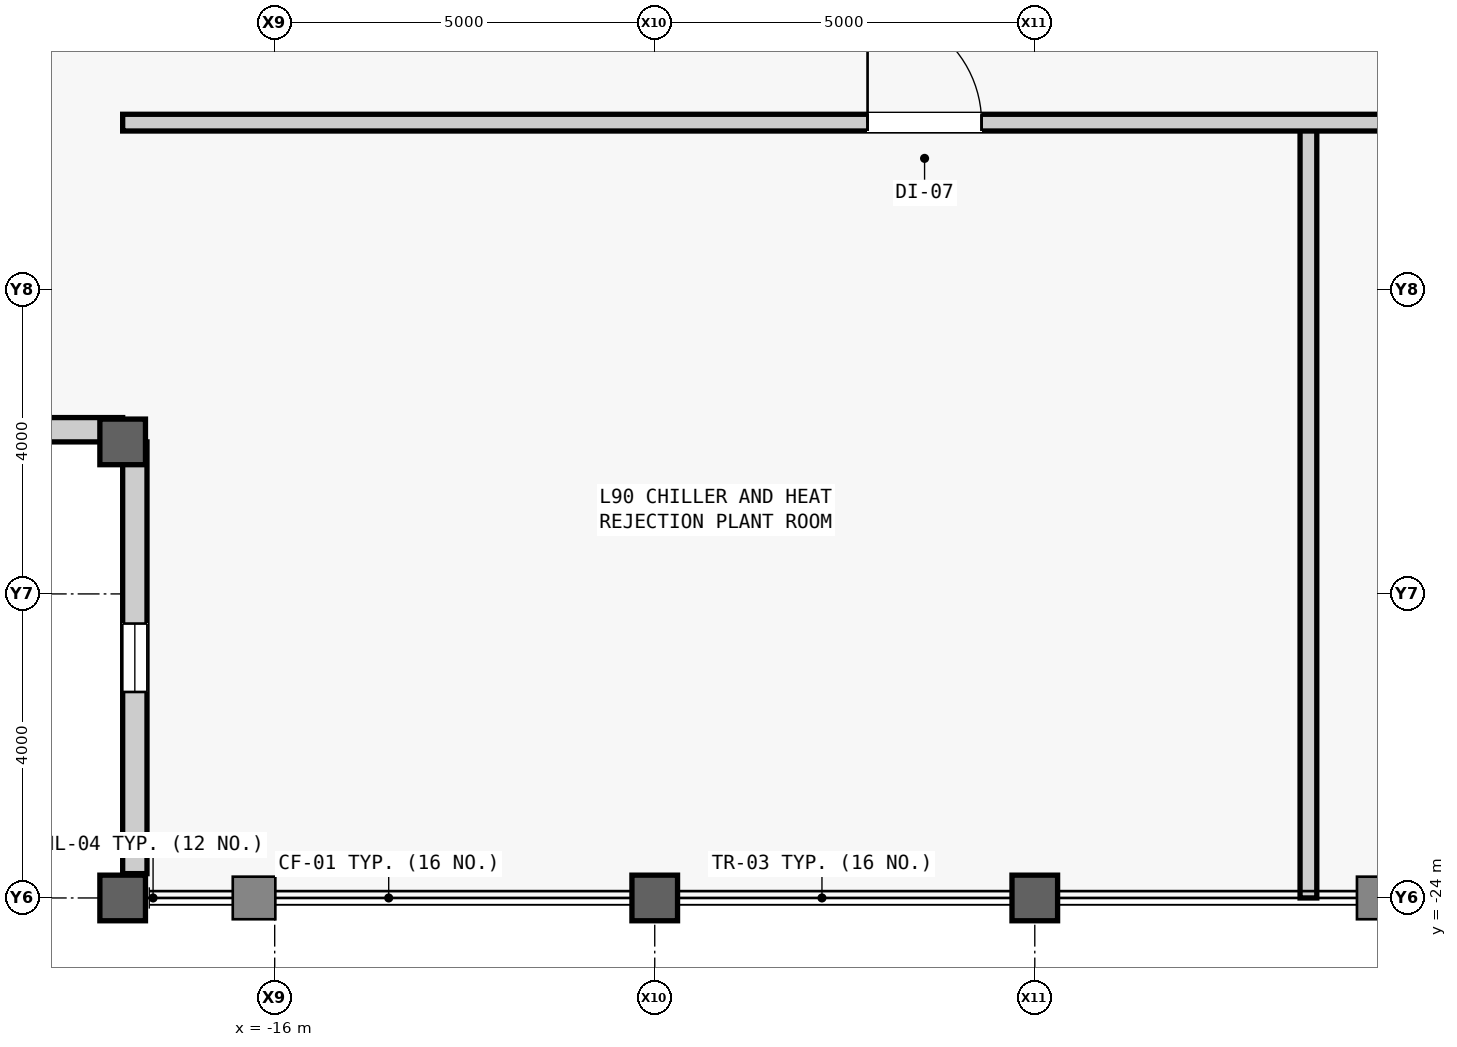
"""IFC4 building model, lengths in metres.
Left out: names, types, materials, properties, quantities, classifications, styles, units other than length and angle.
Written with IfcOpenShell. Run it as: python <this file> out.ifc"""

import sys

from ifc_helpers import new_model, si_unit, direction, frame, frame_2d, origin, origin_2d, place, context, subcontext, project, spatial, rectangle, hollow_rectangle, extrude, source, transform, mapped, element, fill, save


model = new_model("IFC4")
c1 = context("Model", 3, precision=1e-05, world=origin(), true_north=direction((0.0, 1.0)))
c2 = subcontext(c1, "Body", "Model", "MODEL_VIEW")
j1 = project(units=[si_unit("LENGTHUNIT", "METRE"), si_unit("PLANEANGLEUNIT", "RADIAN")], contexts=[c1])
p1 = place(None, origin())
s1 = spatial("IfcSite", under=j1, at=p1, CompositionType="ELEMENT")
p2 = place(p1, origin())
s2 = spatial("IfcBuilding", under=s1, at=p2, CompositionType="ELEMENT")
p3 = place(p2, frame((0.0, 0.0, 380.3)))
s3 = spatial("IfcBuildingStorey", under=s2, at=p3, CompositionType="ELEMENT", Elevation=380.3)
m1 = source(origin(), c2, "Body", "SweptSolid", [
    extrude(hollow_rectangle(XDim=0.6, YDim=0.6, WallThickness=0.035, at=origin_2d()), origin(), (0.0, 0.0, 1.0), 4.8),
])
for number, where, z_axis, x_axis in (
    (1, (-18.0, -24.0, 0.0), (0.0, 0.0, 1.0), (1.0, 0.0, 0.0)),
    (2, (-18.0, -18.0, 0.0), (0.0, 0.0, 1.0), (1.0, 0.0, 0.0)),
    (3, (-11.0, -24.0, 0.0), (0.0, 0.0, 1.0), (1.0, 0.0, 0.0)),
    (4, (-6.0, -24.0, 0.0), (0.0, 0.0, 1.0), (1.0, 0.0, 0.0)),
):
    element("IfcColumn", number, at=place(p3, frame(where, z_axis=z_axis, x_axis=x_axis)), inside=s3, PredefinedType="COLUMN", context=c2, shape_type="MappedRepresentation", body=[
        mapped(m1, transform((0.0, 0.0, 0.0), scale=1.0)),
    ])
m2 = source(origin(), c2, "Body", "SweptSolid", [
    extrude(rectangle(XDim=5.68, YDim=0.32, at=frame_2d((2.84, 0.0))), origin(), (0.0, 0.0, 1.0), 3.901),
])
p4 = place(p3, frame((-18.0, -17.84, 0.0), z_axis=(0.0, 0.0, 1.0), x_axis=(-1.0, 0.0, 0.0)))
e5 = element("IfcWall", 5, at=p4, inside=s3, PredefinedType="STANDARD", context=c2, shape_type="MappedRepresentation", body=[
    mapped(m2, transform((0.0, 0.0, 0.0), scale=1.0)),
])
m3 = source(origin(), c2, "Body", "SweptSolid", [
    extrude(rectangle(XDim=0.9, YDim=2.4, at=frame_2d((0.45, 1.2))), frame((0.0, 0.17, 0.0), z_axis=(0.0, -1.0, 0.0), x_axis=(1.0, 0.0, 0.0)), (0.0, 0.0, 1.0), 0.34),
])
p5 = place(p4, frame((2.39, 0.0, 0.7)))
e6 = element("IfcOpeningElement", 6, at=p5, cuts=e5, PredefinedType="OPENING", context=c2, shape_type="MappedRepresentation", body=[
    mapped(m3, transform((0.0, 0.0, 0.0), scale=1.0)),
])
p6 = place(p3, frame((-17.84, -23.68, 0.0), z_axis=(0.0, 0.0, 1.0), x_axis=(0.0, 1.0, 0.0)))
e7 = element("IfcWall", 7, at=p6, inside=s3, PredefinedType="STANDARD", context=c2, shape_type="MappedRepresentation", body=[
    mapped(m2, transform((0.0, 0.0, 0.0), scale=1.0)),
])
p7 = place(p6, frame((2.39, 0.0, 0.7)))
e8 = element("IfcOpeningElement", 8, at=p7, cuts=e7, PredefinedType="OPENING", context=c2, shape_type="MappedRepresentation", body=[
    mapped(m3, transform((0.0, 0.0, 0.0), scale=1.0)),
])
m4 = source(origin(), c2, "Body", "SweptSolid", [
    extrude(rectangle(XDim=10.2, YDim=0.22, at=frame_2d((5.1, 0.0))), origin(), (0.0, 0.0, 1.0), 4.45),
])
p8 = place(p3, frame((-2.4, -24.0, 0.0), z_axis=(0.0, 0.0, 1.0), x_axis=(0.0, 1.0, 0.0)))
e9 = element("IfcWall", 9, at=p8, inside=s3, PredefinedType="PARTITIONING", context=c2, shape_type="MappedRepresentation", body=[
    mapped(m4, transform((0.0, 0.0, 0.0), scale=1.0)),
])
m5 = source(origin(), c2, "Body", "SweptSolid", [
    extrude(rectangle(XDim=36.0, YDim=0.22, at=frame_2d((18.0, 0.0))), origin(), (0.0, 0.0, 1.0), 4.45),
])
p9 = place(p3, frame((-18.0, -13.8, 0.0), z_axis=(0.0, 0.0, 1.0), x_axis=(1.0, 0.0, 0.0)))
e10 = element("IfcWall", 10, at=p9, inside=s3, PredefinedType="PARTITIONING", context=c2, shape_type="MappedRepresentation", body=[
    mapped(m5, transform((0.0, 0.0, 0.0), scale=1.0)),
])
m6 = source(origin(), c2, "Body", "SweptSolid", [
    extrude(rectangle(XDim=1.5, YDim=2.3, at=frame_2d((0.75, 1.15))), frame((0.0, 0.12, 0.0), z_axis=(0.0, -1.0, 0.0), x_axis=(1.0, 0.0, 0.0)), (0.0, 0.0, 1.0), 0.24),
])
p10 = place(p9, frame((9.8, 0.0, 0.0)))
e11 = element("IfcOpeningElement", 11, at=p10, cuts=e10, PredefinedType="OPENING", context=c2, shape_type="MappedRepresentation", body=[
    mapped(m6, transform((0.0, 0.0, 0.0), scale=1.0)),
])
p11 = place(p9, frame((22.8, 0.0, 0.0)))
e12 = element("IfcOpeningElement", 12, at=p11, cuts=e10, PredefinedType="OPENING", context=c2, shape_type="MappedRepresentation", body=[
    mapped(m6, transform((0.0, 0.0, 0.0), scale=1.0)),
])
m7 = source(origin(), c2, "Body", "SweptSolid", [
    extrude(rectangle(XDim=0.9, YDim=2.4, at=frame_2d((0.45, 1.2))), frame((0.0, 0.03, 0.0), z_axis=(0.0, -1.0, 0.0), x_axis=(1.0, 0.0, 0.0)), (0.0, 0.0, 1.0), 0.06),
])
p12 = place(p7, origin())
e13 = element("IfcWindow", 13, at=p12, inside=s3, PartitioningType="SINGLE_PANEL", PredefinedType="WINDOW", context=c2, shape_type="MappedRepresentation", body=[
    mapped(m7, transform((0.0, 0.0, 0.0), scale=1.0)),
])
fill(e8, e13)
m8 = source(origin(), c2, "Body", "SweptSolid", [
    extrude(rectangle(XDim=1.5, YDim=2.3, at=frame_2d((0.75, 1.15))), frame((0.0, 0.025, 0.0), z_axis=(0.0, -1.0, 0.0), x_axis=(1.0, 0.0, 0.0)), (0.0, 0.0, 1.0), 0.05),
])
p13 = place(p10, origin())
e14 = element("IfcDoor", 14, at=p13, inside=s3, OperationType="SINGLE_SWING_LEFT", PredefinedType="DOOR", context=c2, shape_type="MappedRepresentation", body=[
    mapped(m8, transform((0.0, 0.0, 0.0), scale=1.0)),
])
fill(e11, e14)
save(model, sys.argv[1])
